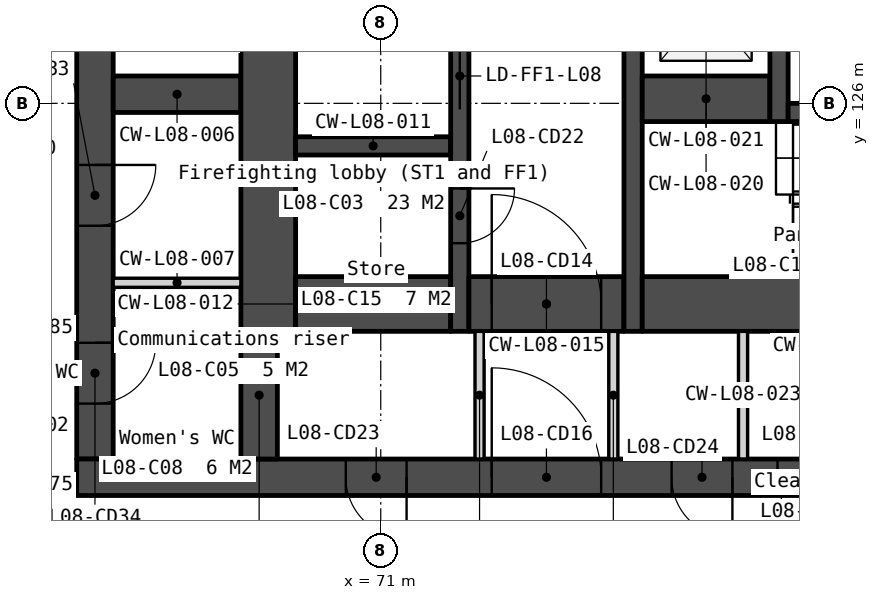
"""IFC4 building model, lengths in metres.
Left out: names, types, materials, properties, quantities, classifications, styles, units other than length and angle.
Written with IfcOpenShell. Run it as: python <this file> out.ifc"""

import sys

from ifc_helpers import new_model, si_unit, direction, frame, frame_2d, origin, place, context, subcontext, project, spatial, polyline, rectangle, outline, extrude, element, fill, save


model = new_model("IFC4")
c1 = context("Model", 3, precision=1e-05, world=origin(), true_north=direction((0.0, 1.0)))
c2 = subcontext(c1, "Body", "Model", "MODEL_VIEW")
j1 = project(units=[si_unit("LENGTHUNIT", "METRE"), si_unit("PLANEANGLEUNIT", "RADIAN")], contexts=[c1])
p1 = place(None, origin())
s1 = spatial("IfcSite", under=j1, at=p1, CompositionType="ELEMENT")
p2 = place(p1, origin())
s2 = spatial("IfcBuilding", under=s1, at=p2, CompositionType="ELEMENT")
p3 = place(p2, frame((0.0, 0.0, 42.0)))
s3 = spatial("IfcBuildingStorey", under=s2, at=p3, CompositionType="ELEMENT", Elevation=42.0)
p4 = place(p3, frame((66.3, 133.95, 0.0), z_axis=(0.0, 0.0, 1.0), x_axis=(0.0, -1.0, 0.0)))
e1 = element("IfcWall", 1, at=p4, inside=s3, PredefinedType="SOLIDWALL", context=c2, shape_type="SweptSolid", body=[
    extrude(rectangle(XDim=13.8, YDim=0.6, at=frame_2d((6.9, 0.0))), origin(), (0.0, 0.0, 1.0), 3.35),
])
p5 = place(p4, frame((0.6, 0.0, 0.0)))
e2 = element("IfcOpeningElement", 2, at=p5, cuts=e1, PredefinedType="OPENING", context=c2, shape_type="SweptSolid", body=[
    extrude(rectangle(XDim=1.1, YDim=2.1, at=frame_2d((0.55, 1.05))), frame((0.0, 0.31, 0.0), z_axis=(0.0, -1.0, 0.0), x_axis=(1.0, 0.0, 0.0)), (0.0, 0.0, 1.0), 0.62),
])
p6 = place(p4, frame((8.963, 0.0, 0.0)))
e3 = element("IfcOpeningElement", 3, at=p6, cuts=e1, PredefinedType="OPENING", context=c2, shape_type="SweptSolid", body=[
    extrude(rectangle(XDim=1.0, YDim=2.1, at=frame_2d((0.5, 1.05))), frame((0.0, 0.31, 0.0), z_axis=(0.0, -1.0, 0.0), x_axis=(1.0, 0.0, 0.0)), (0.0, 0.0, 1.0), 0.62),
])
p7 = place(p4, frame((11.888, 0.0, 0.0)))
e4 = element("IfcOpeningElement", 4, at=p7, cuts=e1, PredefinedType="OPENING", context=c2, shape_type="SweptSolid", body=[
    extrude(rectangle(XDim=1.0, YDim=2.1, at=frame_2d((0.5, 1.05))), frame((0.0, 0.31, 0.0), z_axis=(0.0, -1.0, 0.0), x_axis=(1.0, 0.0, 0.0)), (0.0, 0.0, 1.0), 0.62),
])
p8 = place(p3, frame((66.0, 119.85, 0.0), z_axis=(0.0, 0.0, 1.0), x_axis=(1.0, 0.0, 0.0)))
e5 = element("IfcWall", 5, at=p8, inside=s3, PredefinedType="SOLIDWALL", context=c2, shape_type="SweptSolid", body=[
    extrude(rectangle(XDim=28.0, YDim=0.6, at=frame_2d((14.0, 0.0))), origin(), (0.0, 0.0, 1.0), 3.35),
])
p9 = place(p8, frame((6.825, 0.0, 0.0)))
e6 = element("IfcOpeningElement", 6, at=p9, cuts=e5, PredefinedType="OPENING", context=c2, shape_type="SweptSolid", body=[
    extrude(rectangle(XDim=1.8, YDim=2.1, at=frame_2d((0.9, 1.05))), frame((0.0, 0.31, 0.0), z_axis=(0.0, -1.0, 0.0), x_axis=(1.0, 0.0, 0.0)), (0.0, 0.0, 1.0), 0.62),
])
p10 = place(p8, frame((15.85, 0.0, 0.0)))
e7 = element("IfcOpeningElement", 7, at=p10, cuts=e5, PredefinedType="OPENING", context=c2, shape_type="SweptSolid", body=[
    extrude(rectangle(XDim=1.5, YDim=2.1, at=frame_2d((0.75, 1.05))), frame((0.0, 0.31, 0.0), z_axis=(0.0, -1.0, 0.0), x_axis=(1.0, 0.0, 0.0)), (0.0, 0.0, 1.0), 0.62),
])
p11 = place(p8, frame((19.375, 0.0, 0.0)))
e8 = element("IfcOpeningElement", 8, at=p11, cuts=e5, PredefinedType="OPENING", context=c2, shape_type="SweptSolid", body=[
    extrude(rectangle(XDim=1.8, YDim=2.1, at=frame_2d((0.9, 1.05))), frame((0.0, 0.31, 0.0), z_axis=(0.0, -1.0, 0.0), x_axis=(1.0, 0.0, 0.0)), (0.0, 0.0, 1.0), 0.62),
])
p12 = place(p8, frame((4.425, 0.0, 0.0)))
e9 = element("IfcOpeningElement", 9, at=p12, cuts=e5, PredefinedType="OPENING", context=c2, shape_type="SweptSolid", body=[
    extrude(rectangle(XDim=1.0, YDim=2.1, at=frame_2d((0.5, 1.05))), frame((0.0, 0.31, 0.0), z_axis=(0.0, -1.0, 0.0), x_axis=(1.0, 0.0, 0.0)), (0.0, 0.0, 1.0), 0.62),
])
p13 = place(p8, frame((9.783, 0.0, 0.0)))
e10 = element("IfcOpeningElement", 10, at=p13, cuts=e5, PredefinedType="OPENING", context=c2, shape_type="SweptSolid", body=[
    extrude(rectangle(XDim=1.0, YDim=2.1, at=frame_2d((0.5, 1.05))), frame((0.0, 0.31, 0.0), z_axis=(0.0, -1.0, 0.0), x_axis=(1.0, 0.0, 0.0)), (0.0, 0.0, 1.0), 0.62),
])
p14 = place(p8, frame((11.525, 0.0, 0.0)))
e11 = element("IfcOpeningElement", 11, at=p14, cuts=e5, PredefinedType="OPENING", context=c2, shape_type="SweptSolid", body=[
    extrude(rectangle(XDim=1.0, YDim=2.1, at=frame_2d((0.5, 1.05))), frame((0.0, 0.31, 0.0), z_axis=(0.0, -1.0, 0.0), x_axis=(1.0, 0.0, 0.0)), (0.0, 0.0, 1.0), 0.62),
])
p15 = place(p8, frame((13.658, 0.0, 0.0)))
e12 = element("IfcOpeningElement", 12, at=p15, cuts=e5, PredefinedType="OPENING", context=c2, shape_type="SweptSolid", body=[
    extrude(rectangle(XDim=1.0, YDim=2.1, at=frame_2d((0.5, 1.05))), frame((0.0, 0.31, 0.0), z_axis=(0.0, -1.0, 0.0), x_axis=(1.0, 0.0, 0.0)), (0.0, 0.0, 1.0), 0.62),
])
p16 = place(p8, frame((22.575, 0.0, 0.0)))
e13 = element("IfcOpeningElement", 13, at=p16, cuts=e5, PredefinedType="OPENING", context=c2, shape_type="SweptSolid", body=[
    extrude(rectangle(XDim=1.0, YDim=2.1, at=frame_2d((0.5, 1.05))), frame((0.0, 0.31, 0.0), z_axis=(0.0, -1.0, 0.0), x_axis=(1.0, 0.0, 0.0)), (0.0, 0.0, 1.0), 0.62),
])
p17 = place(p3, frame((66.6, 126.15, 0.0), z_axis=(0.0, 0.0, 1.0), x_axis=(1.0, 0.0, 0.0)))
e14 = element("IfcWall", 14, at=p17, inside=s3, PredefinedType="SOLIDWALL", context=c2, shape_type="SweptSolid", body=[
    extrude(rectangle(XDim=2.1, YDim=0.6, at=frame_2d((1.05, 0.0))), origin(), (0.0, 0.0, 1.0), 3.35),
])
p18 = place(p3, frame((66.6, 123.049, 0.0), z_axis=(0.0, 0.0, 1.0), x_axis=(1.0, 0.0, 0.0)))
e15 = element("IfcWall", 15, at=p18, inside=s3, PredefinedType="PARTITIONING", context=c2, shape_type="SweptSolid", body=[
    extrude(rectangle(XDim=2.1, YDim=0.15, at=frame_2d((1.05, 0.0))), origin(), (0.0, 0.0, 1.0), 3.35),
])
p19 = place(p3, frame((69.15, 133.95, 0.0), z_axis=(0.0, 0.0, 1.0), x_axis=(0.0, -1.0, 0.0)))
e16 = element("IfcWall", 16, at=p19, inside=s3, PredefinedType="SOLIDWALL", context=c2, shape_type="SweptSolid", body=[
    extrude(rectangle(XDim=11.7, YDim=0.9, at=frame_2d((5.85, 0.0))), origin(), (0.0, 0.0, 1.0), 3.35),
])
p20 = place(p3, frame((69.0, 122.25, 0.0), z_axis=(0.0, 0.0, 1.0), x_axis=(0.0, -1.0, 0.0)))
e17 = element("IfcWall", 17, at=p20, inside=s3, PredefinedType="SOLIDWALL", context=c2, shape_type="SweptSolid", body=[
    extrude(rectangle(XDim=2.1, YDim=0.6, at=frame_2d((1.05, 0.0))), origin(), (0.0, 0.0, 1.0), 3.35),
])
p21 = place(p3, frame((69.6, 125.3, 0.0), z_axis=(0.0, 0.0, 1.0), x_axis=(1.0, 0.0, 0.0)))
e18 = element("IfcWall", 18, at=p21, inside=s3, PredefinedType="SOLIDWALL", context=c2, shape_type="SweptSolid", body=[
    extrude(rectangle(XDim=2.55, YDim=0.3, at=frame_2d((1.275, 0.0))), origin(), (0.0, 0.0, 1.0), 3.35),
])
p22 = place(p3, frame((69.6, 122.7, 0.0), z_axis=(0.0, 0.0, 1.0), x_axis=(1.0, 0.0, 0.0)))
e19 = element("IfcWall", 19, at=p22, inside=s3, PredefinedType="SOLIDWALL", context=c2, shape_type="SweptSolid", body=[
    extrude(rectangle(XDim=2.55, YDim=0.9, at=frame_2d((1.275, 0.0))), origin(), (0.0, 0.0, 1.0), 3.35),
])
p23 = place(p3, frame((72.3, 133.95, 0.0), z_axis=(0.0, 0.0, 1.0), x_axis=(0.0, -1.0, 0.0)))
e20 = element("IfcWall", 20, at=p23, inside=s3, PredefinedType="SOLIDWALL", context=c2, shape_type="SweptSolid", body=[
    extrude(rectangle(XDim=11.7, YDim=0.3, at=frame_2d((5.85, 0.0))), origin(), (0.0, 0.0, 1.0), 3.35),
])
p24 = place(p23, frame((6.95, 0.0, 0.0)))
e21 = element("IfcOpeningElement", 21, at=p24, cuts=e20, PredefinedType="OPENING", context=c2, shape_type="SweptSolid", body=[
    extrude(rectangle(XDim=1.1, YDim=2.1, at=frame_2d((0.55, 1.05))), frame((0.0, 0.16, 0.0), z_axis=(0.0, -1.0, 0.0), x_axis=(1.0, 0.0, 0.0)), (0.0, 0.0, 1.0), 0.32),
])
p25 = place(p23, frame((9.35, 0.0, 0.0)))
e22 = element("IfcOpeningElement", 22, at=p25, cuts=e20, PredefinedType="OPENING", context=c2, shape_type="SweptSolid", body=[
    extrude(rectangle(XDim=0.9, YDim=2.1, at=frame_2d((0.45, 1.05))), frame((0.0, 0.16, 0.0), z_axis=(0.0, -1.0, 0.0), x_axis=(1.0, 0.0, 0.0)), (0.0, 0.0, 1.0), 0.32),
])
p26 = place(p23, frame((5.1, 0.0, 0.0)))
e23 = element("IfcOpeningElement", 23, at=p26, cuts=e20, PredefinedType="OPENING", context=c2, shape_type="SweptSolid", body=[
    extrude(rectangle(XDim=1.0, YDim=2.1, at=frame_2d((0.5, 1.05))), frame((0.0, 0.16, 0.0), z_axis=(0.0, -1.0, 0.0), x_axis=(1.0, 0.0, 0.0)), (0.0, 0.0, 1.0), 0.32),
])
p27 = place(p3, frame((72.45, 122.7, 0.0), z_axis=(0.0, 0.0, 1.0), x_axis=(1.0, 0.0, 0.0)))
e24 = element("IfcWall", 24, at=p27, inside=s3, PredefinedType="SOLIDWALL", context=c2, shape_type="SweptSolid", body=[
    extrude(rectangle(XDim=2.55, YDim=0.9, at=frame_2d((1.275, 0.0))), origin(), (0.0, 0.0, 1.0), 3.35),
])
p28 = place(p27, frame((0.375, 0.0, 0.0)))
e25 = element("IfcOpeningElement", 25, at=p28, cuts=e24, PredefinedType="OPENING", context=c2, shape_type="SweptSolid", body=[
    extrude(rectangle(XDim=1.8, YDim=2.1, at=frame_2d((0.9, 1.05))), frame((0.0, 0.46, 0.0), z_axis=(0.0, -1.0, 0.0), x_axis=(1.0, 0.0, 0.0)), (0.0, 0.0, 1.0), 0.92),
])
for number, where, z_axis, x_axis in (
    (26, (72.625, 122.25, 0.0), (0.0, 0.0, 1.0), (0.0, -1.0, 0.0)),
    (27, (74.825, 122.25, 0.0), (0.0, 0.0, 1.0), (0.0, -1.0, 0.0)),
):
    element("IfcWall", number, at=place(p3, frame(where, z_axis=z_axis, x_axis=x_axis)), inside=s3, PredefinedType="PARTITIONING", context=c2, shape_type="SweptSolid", body=[
        extrude(rectangle(XDim=2.1, YDim=0.15, at=frame_2d((1.05, 0.0))), origin(), (0.0, 0.0, 1.0), 3.35),
    ])
p29 = place(p3, frame((75.15, 133.95, 0.0), z_axis=(0.0, 0.0, 1.0), x_axis=(0.0, -1.0, 0.0)))
e28 = element("IfcWall", 28, at=p29, inside=s3, PredefinedType="SOLIDWALL", context=c2, shape_type="SweptSolid", body=[
    extrude(rectangle(XDim=11.7, YDim=0.3, at=frame_2d((5.85, 0.0))), origin(), (0.0, 0.0, 1.0), 3.35),
])
p30 = place(p3, frame((75.3, 126.075, 0.0), z_axis=(0.0, 0.0, 1.0), x_axis=(1.0, 0.0, 0.0)))
e29 = element("IfcWall", 29, at=p30, inside=s3, PredefinedType="SOLIDWALL", context=c2, shape_type="SweptSolid", body=[
    extrude(rectangle(XDim=2.1, YDim=0.75, at=frame_2d((1.05, 0.0))), origin(), (0.0, 0.0, 1.0), 3.35),
])
p31 = place(p3, frame((75.3, 122.7, 0.0), z_axis=(0.0, 0.0, 1.0), x_axis=(1.0, 0.0, 0.0)))
e30 = element("IfcWall", 30, at=p31, inside=s3, PredefinedType="SOLIDWALL", context=c2, shape_type="SweptSolid", body=[
    extrude(rectangle(XDim=6.2, YDim=0.9, at=frame_2d((3.1, 0.0))), origin(), (0.0, 0.0, 1.0), 3.35),
])
p32 = place(p3, frame((76.958, 122.25, 0.0), z_axis=(0.0, 0.0, 1.0), x_axis=(0.0, -1.0, 0.0)))
e31 = element("IfcWall", 31, at=p32, inside=s3, PredefinedType="PARTITIONING", context=c2, shape_type="SweptSolid", body=[
    extrude(rectangle(XDim=2.1, YDim=0.15, at=frame_2d((1.05, 0.0))), origin(), (0.0, 0.0, 1.0), 3.35),
])
p33 = place(p3, frame((77.55, 133.95, 0.0), z_axis=(0.0, 0.0, 1.0), x_axis=(0.0, -1.0, 0.0)))
e32 = element("IfcWall", 32, at=p33, inside=s3, PredefinedType="SOLIDWALL", context=c2, shape_type="SweptSolid", body=[
    extrude(rectangle(XDim=8.25, YDim=0.3, at=frame_2d((4.125, 0.0))), origin(), (0.0, 0.0, 1.0), 3.35),
])
p34 = place(p33, frame((0.6, 0.0, 0.0)))
e33 = element("IfcOpeningElement", 33, at=p34, cuts=e32, PredefinedType="OPENING", context=c2, shape_type="SweptSolid", body=[
    extrude(rectangle(XDim=1.1, YDim=2.1, at=frame_2d((0.55, 1.05))), frame((0.0, 0.16, 0.0), z_axis=(0.0, -1.0, 0.0), x_axis=(1.0, 0.0, 0.0)), (0.0, 0.0, 1.0), 0.32),
])
p35 = place(p33, frame((3.2, 0.0, 0.0)))
e34 = element("IfcOpeningElement", 34, at=p35, cuts=e32, PredefinedType="OPENING", context=c2, shape_type="SweptSolid", body=[
    extrude(rectangle(XDim=1.1, YDim=2.1, at=frame_2d((0.55, 1.05))), frame((0.0, 0.16, 0.0), z_axis=(0.0, -1.0, 0.0), x_axis=(1.0, 0.0, 0.0)), (0.0, 0.0, 1.0), 0.32),
])
p36 = place(p33, frame((5.8, 0.0, 0.0)))
e35 = element("IfcOpeningElement", 35, at=p36, cuts=e32, PredefinedType="OPENING", context=c2, shape_type="SweptSolid", body=[
    extrude(rectangle(XDim=1.1, YDim=2.1, at=frame_2d((0.55, 1.05))), frame((0.0, 0.16, 0.0), z_axis=(0.0, -1.0, 0.0), x_axis=(1.0, 0.0, 0.0)), (0.0, 0.0, 1.0), 0.32),
])
p37 = place(p3, frame((77.7, 125.85, 0.0), z_axis=(0.0, 0.0, 1.0), x_axis=(1.0, 0.0, 0.0)))
e36 = element("IfcWall", 36, at=p37, inside=s3, PredefinedType="SOLIDWALL", context=c2, shape_type="SweptSolid", body=[
    extrude(rectangle(XDim=4.6, YDim=0.3, at=frame_2d((2.3, 0.0))), origin(), (0.0, 0.0, 1.0), 3.35),
])
p38 = place(p3, frame((54.495, 129.397, -0.15), z_axis=(0.0, 0.0, 1.0), x_axis=(0.499999201451, -0.866025864826, 0.0)))
e37 = element("IfcWall", 37, at=p38, inside=s3, PredefinedType="SOLIDWALL", context=c2, shape_type="SweptSolid", body=[
    extrude(outline(polyline([(44.8, 0.0), (44.8, 3.5), (0.0, 3.5), (0.0, 0.0), (44.8, 0.0)])), frame((0.0, 0.225, 0.0), z_axis=(0.0, -1.0, 0.0), x_axis=(1.0, 0.0, 0.0)), (0.0, 0.0, 1.0), 0.45),
])
p39 = place(p38, frame((0.786, 0.0, 1.05)))
e38 = element("IfcOpeningElement", 38, at=p39, cuts=e37, PredefinedType="OPENING", context=c2, shape_type="SweptSolid", body=[
    extrude(rectangle(XDim=1.2, YDim=1.5, at=frame_2d((0.6, 0.75))), frame((0.0, 0.235, 0.0), z_axis=(0.0, -1.0, 0.0), x_axis=(1.0, 0.0, 0.0)), (0.0, 0.0, 1.0), 0.47),
])
p40 = place(p38, frame((6.91, 0.0, 1.05)))
e39 = element("IfcOpeningElement", 39, at=p40, cuts=e37, PredefinedType="OPENING", context=c2, shape_type="SweptSolid", body=[
    extrude(rectangle(XDim=1.8, YDim=1.5, at=frame_2d((0.9, 0.75))), frame((0.0, 0.235, 0.0), z_axis=(0.0, -1.0, 0.0), x_axis=(1.0, 0.0, 0.0)), (0.0, 0.0, 1.0), 0.47),
])
p41 = place(p38, frame((9.21, 0.0, 1.05)))
e40 = element("IfcOpeningElement", 40, at=p41, cuts=e37, PredefinedType="OPENING", context=c2, shape_type="SweptSolid", body=[
    extrude(rectangle(XDim=1.8, YDim=1.5, at=frame_2d((0.9, 0.75))), frame((0.0, 0.235, 0.0), z_axis=(0.0, -1.0, 0.0), x_axis=(1.0, 0.0, 0.0)), (0.0, 0.0, 1.0), 0.47),
])
p42 = place(p38, frame((15.87, 0.0, 1.05)))
e41 = element("IfcOpeningElement", 41, at=p42, cuts=e37, PredefinedType="OPENING", context=c2, shape_type="SweptSolid", body=[
    extrude(rectangle(XDim=1.8, YDim=1.5, at=frame_2d((0.9, 0.75))), frame((0.0, 0.235, 0.0), z_axis=(0.0, -1.0, 0.0), x_axis=(1.0, 0.0, 0.0)), (0.0, 0.0, 1.0), 0.47),
])
p43 = place(p38, frame((18.17, 0.0, 1.05)))
e42 = element("IfcOpeningElement", 42, at=p43, cuts=e37, PredefinedType="OPENING", context=c2, shape_type="SweptSolid", body=[
    extrude(rectangle(XDim=1.8, YDim=1.5, at=frame_2d((0.9, 0.75))), frame((0.0, 0.235, 0.0), z_axis=(0.0, -1.0, 0.0), x_axis=(1.0, 0.0, 0.0)), (0.0, 0.0, 1.0), 0.47),
])
p44 = place(p38, frame((24.83, 0.0, 1.05)))
e43 = element("IfcOpeningElement", 43, at=p44, cuts=e37, PredefinedType="OPENING", context=c2, shape_type="SweptSolid", body=[
    extrude(rectangle(XDim=1.8, YDim=1.5, at=frame_2d((0.9, 0.75))), frame((0.0, 0.235, 0.0), z_axis=(0.0, -1.0, 0.0), x_axis=(1.0, 0.0, 0.0)), (0.0, 0.0, 1.0), 0.47),
])
p45 = place(p38, frame((27.13, 0.0, 1.05)))
e44 = element("IfcOpeningElement", 44, at=p45, cuts=e37, PredefinedType="OPENING", context=c2, shape_type="SweptSolid", body=[
    extrude(rectangle(XDim=1.8, YDim=1.5, at=frame_2d((0.9, 0.75))), frame((0.0, 0.235, 0.0), z_axis=(0.0, -1.0, 0.0), x_axis=(1.0, 0.0, 0.0)), (0.0, 0.0, 1.0), 0.47),
])
p46 = place(p38, frame((33.79, 0.0, 1.05)))
e45 = element("IfcOpeningElement", 45, at=p46, cuts=e37, PredefinedType="OPENING", context=c2, shape_type="SweptSolid", body=[
    extrude(rectangle(XDim=1.8, YDim=1.5, at=frame_2d((0.9, 0.75))), frame((0.0, 0.235, 0.0), z_axis=(0.0, -1.0, 0.0), x_axis=(1.0, 0.0, 0.0)), (0.0, 0.0, 1.0), 0.47),
])
p47 = place(p38, frame((36.09, 0.0, 1.05)))
e46 = element("IfcOpeningElement", 46, at=p47, cuts=e37, PredefinedType="OPENING", context=c2, shape_type="SweptSolid", body=[
    extrude(rectangle(XDim=1.8, YDim=1.5, at=frame_2d((0.9, 0.75))), frame((0.0, 0.235, 0.0), z_axis=(0.0, -1.0, 0.0), x_axis=(1.0, 0.0, 0.0)), (0.0, 0.0, 1.0), 0.47),
])
p48 = place(p38, frame((42.814, 0.0, 1.05)))
e47 = element("IfcOpeningElement", 47, at=p48, cuts=e37, PredefinedType="OPENING", context=c2, shape_type="SweptSolid", body=[
    extrude(rectangle(XDim=1.2, YDim=1.5, at=frame_2d((0.6, 0.75))), frame((0.0, 0.235, 0.0), z_axis=(0.0, -1.0, 0.0), x_axis=(1.0, 0.0, 0.0)), (0.0, 0.0, 1.0), 0.47),
])
p49 = place(p24, origin())
e48 = element("IfcDoor", 48, at=p49, inside=s3, OperationType="SLIDING_TO_LEFT", PredefinedType="DOOR", context=c2, shape_type="SweptSolid", body=[
    extrude(rectangle(XDim=1.1, YDim=2.1, at=frame_2d((0.55, 1.05))), frame((0.0, 0.025, 0.0), z_axis=(0.0, -1.0, 0.0), x_axis=(1.0, 0.0, 0.0)), (0.0, 0.0, 1.0), 0.05),
])
fill(e21, e48)
p50 = place(p28, origin())
e49 = element("IfcDoor", 49, at=p50, inside=s3, OperationType="DOUBLE_DOOR_DOUBLE_SWING", PredefinedType="DOOR", context=c2, shape_type="SweptSolid", body=[
    extrude(rectangle(XDim=1.8, YDim=2.1, at=frame_2d((0.9, 1.05))), frame((0.0, 0.025, 0.0), z_axis=(0.0, -1.0, 0.0), x_axis=(1.0, 0.0, 0.0)), (0.0, 0.0, 1.0), 0.05),
])
fill(e25, e49)
p51 = place(p9, origin())
e50 = element("IfcDoor", 50, at=p51, inside=s3, OperationType="DOUBLE_DOOR_DOUBLE_SWING", PredefinedType="DOOR", context=c2, shape_type="SweptSolid", body=[
    extrude(rectangle(XDim=1.8, YDim=2.1, at=frame_2d((0.9, 1.05))), frame((0.0, 0.025, 0.0), z_axis=(0.0, -1.0, 0.0), x_axis=(1.0, 0.0, 0.0)), (0.0, 0.0, 1.0), 0.05),
])
fill(e6, e50)
p52 = place(p25, origin())
e51 = element("IfcDoor", 51, at=p52, inside=s3, OperationType="SINGLE_SWING_LEFT", PredefinedType="DOOR", context=c2, shape_type="SweptSolid", body=[
    extrude(rectangle(XDim=0.9, YDim=2.1, at=frame_2d((0.45, 1.05))), frame((0.0, 0.025, 0.0), z_axis=(0.0, -1.0, 0.0), x_axis=(1.0, 0.0, 0.0)), (0.0, 0.0, 1.0), 0.05),
])
fill(e22, e51)
p53 = place(p12, origin())
e52 = element("IfcDoor", 52, at=p53, inside=s3, OperationType="SINGLE_SWING_RIGHT", PredefinedType="DOOR", context=c2, shape_type="SweptSolid", body=[
    extrude(rectangle(XDim=1.0, YDim=2.1, at=frame_2d((0.5, 1.05))), frame((0.0, 0.025, 0.0), z_axis=(0.0, -1.0, 0.0), x_axis=(1.0, 0.0, 0.0)), (0.0, 0.0, 1.0), 0.05),
])
fill(e9, e52)
p54 = place(p13, origin())
e53 = element("IfcDoor", 53, at=p54, inside=s3, OperationType="SINGLE_SWING_RIGHT", PredefinedType="DOOR", context=c2, shape_type="SweptSolid", body=[
    extrude(rectangle(XDim=1.0, YDim=2.1, at=frame_2d((0.5, 1.05))), frame((0.0, 0.025, 0.0), z_axis=(0.0, -1.0, 0.0), x_axis=(1.0, 0.0, 0.0)), (0.0, 0.0, 1.0), 0.05),
])
fill(e10, e53)
p55 = place(p14, origin())
e54 = element("IfcDoor", 54, at=p55, inside=s3, OperationType="SINGLE_SWING_RIGHT", PredefinedType="DOOR", context=c2, shape_type="SweptSolid", body=[
    extrude(rectangle(XDim=1.0, YDim=2.1, at=frame_2d((0.5, 1.05))), frame((0.0, 0.025, 0.0), z_axis=(0.0, -1.0, 0.0), x_axis=(1.0, 0.0, 0.0)), (0.0, 0.0, 1.0), 0.05),
])
fill(e11, e54)
p56 = place(p6, origin())
e55 = element("IfcDoor", 55, at=p56, inside=s3, OperationType="SINGLE_SWING_LEFT", PredefinedType="DOOR", context=c2, shape_type="SweptSolid", body=[
    extrude(rectangle(XDim=1.0, YDim=2.1, at=frame_2d((0.5, 1.05))), frame((0.0, 0.025, 0.0), z_axis=(0.0, -1.0, 0.0), x_axis=(1.0, 0.0, 0.0)), (0.0, 0.0, 1.0), 0.05),
])
fill(e3, e55)
p57 = place(p7, origin())
e56 = element("IfcDoor", 56, at=p57, inside=s3, OperationType="SINGLE_SWING_LEFT", PredefinedType="DOOR", context=c2, shape_type="SweptSolid", body=[
    extrude(rectangle(XDim=1.0, YDim=2.1, at=frame_2d((0.5, 1.05))), frame((0.0, 0.025, 0.0), z_axis=(0.0, -1.0, 0.0), x_axis=(1.0, 0.0, 0.0)), (0.0, 0.0, 1.0), 0.05),
])
fill(e4, e56)
save(model, sys.argv[1])
